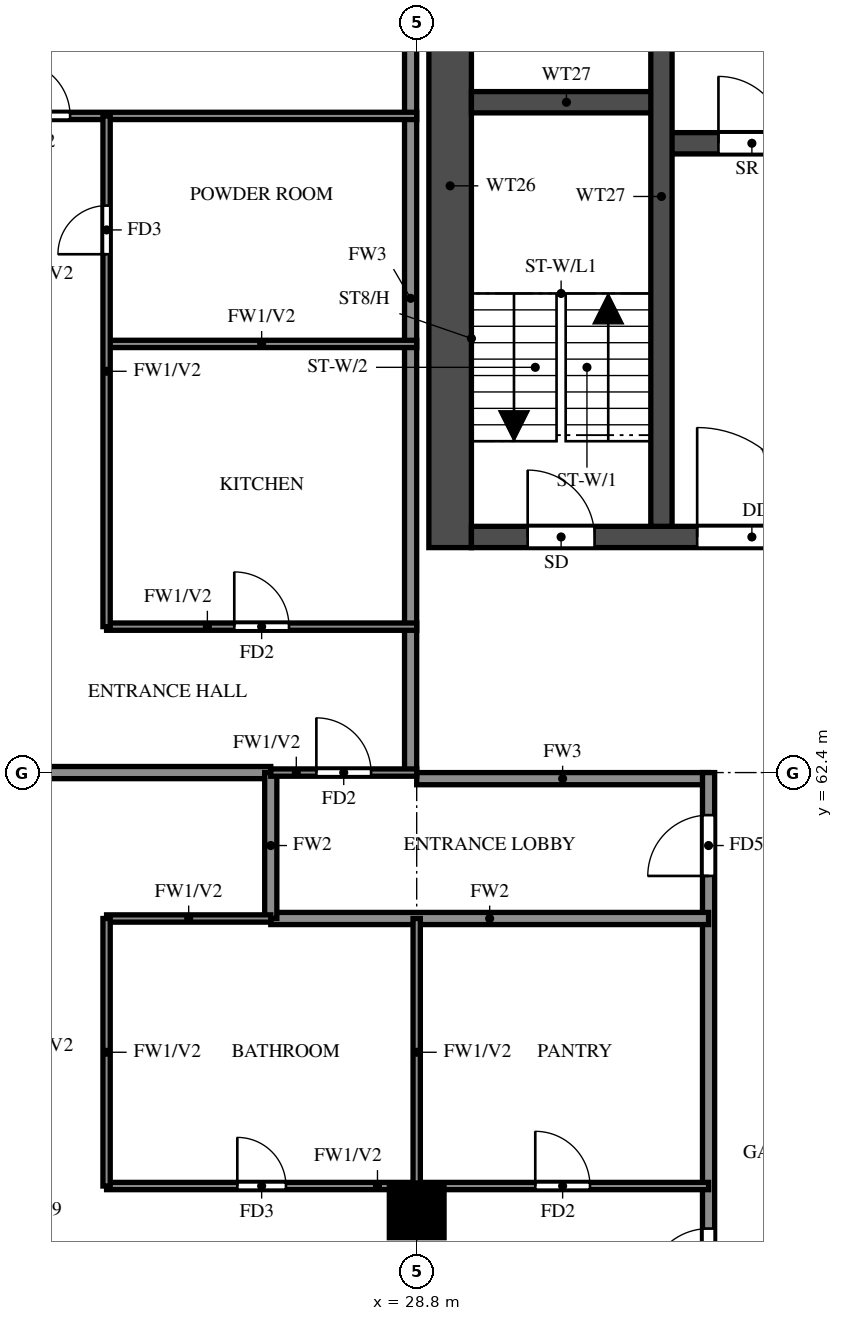
"""IFC4 building model, lengths in metres.
Left out: names, types, materials, properties, quantities, classifications, styles, units other than length and angle.
Written with IfcOpenShell. Run it as: python <this file> out.ifc"""

import sys

from ifc_helpers import new_model, si_unit, direction, frame, frame_2d, origin, origin_2d, place, context, subcontext, project, spatial, rectangle, extrude, source, transform, mapped, element, fill, save


model = new_model("IFC4")
c1 = context("Model", 3, precision=1e-05, world=origin(), true_north=direction((0.0, 1.0)))
c2 = subcontext(c1, "Body", "Model", "MODEL_VIEW")
j1 = project(units=[si_unit("LENGTHUNIT", "METRE"), si_unit("PLANEANGLEUNIT", "RADIAN")], contexts=[c1])
p1 = place(None, origin())
s1 = spatial("IfcSite", under=j1, at=p1, CompositionType="ELEMENT")
p2 = place(p1, origin())
s2 = spatial("IfcBuilding", under=s1, at=p2, CompositionType="ELEMENT")
p3 = place(p2, frame((0.0, 0.0, 199.0)))
s3 = spatial("IfcBuildingStorey", under=s2, at=p3, CompositionType="ELEMENT", Elevation=199.0)
m1 = source(origin(), c2, "Body", "SweptSolid", [
    extrude(rectangle(XDim=0.9, YDim=0.9, at=origin_2d()), origin(), (0.0, 0.0, 1.0), 3.2),
])
p4 = place(p3, frame((28.8, 55.2, 0.0), z_axis=(0.0, 0.0, 1.0), x_axis=(1.0, 0.0, 0.0)))
e1 = element("IfcColumn", 1, at=p4, inside=s3, PredefinedType="COLUMN", context=c2, shape_type="MappedRepresentation", body=[
    mapped(m1, transform((0.0, 0.0, 0.0))),
])
p5 = place(p3, frame((29.35, 66.1, 0.0), z_axis=(0.0, 0.0, 1.0), x_axis=(0.0, 1.0, 0.0)))
e2 = element("IfcWall", 2, at=p5, inside=s3, PredefinedType="SHEAR", context=c2, shape_type="SweptSolid", body=[
    extrude(rectangle(XDim=11.9, YDim=0.7, at=frame_2d((5.95, 0.0))), origin(), (0.0, 0.0, 1.0), 3.2),
])
p6 = place(p3, frame((29.7, 66.275, 0.0), z_axis=(0.0, 0.0, 1.0), x_axis=(1.0, 0.0, 0.0)))
e3 = element("IfcWall", 3, at=p6, inside=s3, PredefinedType="SHEAR", context=c2, shape_type="SweptSolid", body=[
    extrude(rectangle(XDim=41.4, YDim=0.35, at=frame_2d((20.7, 0.0))), origin(), (0.0, 0.0, 1.0), 3.2),
])
p7 = place(p6, frame((0.925, 0.0, 0.0)))
e4 = element("IfcOpeningElement", 4, at=p7, cuts=e3, PredefinedType="OPENING", context=c2, shape_type="SweptSolid", body=[
    extrude(rectangle(XDim=1.1, YDim=2.1, at=frame_2d((0.55, 1.05))), frame((0.0, 0.185, 0.0), z_axis=(0.0, -1.0, 0.0), x_axis=(1.0, 0.0, 0.0)), (0.0, 0.0, 1.0), 0.37),
])
p8 = place(p6, frame((3.712, 0.0, 0.0)))
e5 = element("IfcOpeningElement", 5, at=p8, cuts=e3, PredefinedType="OPENING", context=c2, shape_type="SweptSolid", body=[
    extrude(rectangle(XDim=1.8, YDim=2.1, at=frame_2d((0.9, 1.05))), frame((0.0, 0.185, 0.0), z_axis=(0.0, -1.0, 0.0), x_axis=(1.0, 0.0, 0.0)), (0.0, 0.0, 1.0), 0.37),
])
p9 = place(p3, frame((32.825, 72.75, 0.0), z_axis=(0.0, 0.0, 1.0), x_axis=(1.0, 0.0, 0.0)))
e6 = element("IfcWall", 6, at=p9, inside=s3, PredefinedType="SHEAR", context=c2, shape_type="SweptSolid", body=[
    extrude(rectangle(XDim=35.15, YDim=0.35, at=frame_2d((17.575, 0.0))), origin(), (0.0, 0.0, 1.0), 3.2),
])
p10 = place(p9, frame((19.8, 0.0, 0.0)))
e7 = element("IfcOpeningElement", 7, at=p10, cuts=e6, PredefinedType="OPENING", context=c2, shape_type="SweptSolid", body=[
    extrude(rectangle(XDim=1.1, YDim=2.1, at=frame_2d((0.55, 1.05))), frame((0.0, 0.185, 0.0), z_axis=(0.0, -1.0, 0.0), x_axis=(1.0, 0.0, 0.0)), (0.0, 0.0, 1.0), 0.37),
])
p11 = place(p9, frame((27.7, 0.0, 0.0)))
e8 = element("IfcOpeningElement", 8, at=p11, cuts=e6, PredefinedType="OPENING", context=c2, shape_type="SweptSolid", body=[
    extrude(rectangle(XDim=1.1, YDim=2.1, at=frame_2d((0.55, 1.05))), frame((0.0, 0.185, 0.0), z_axis=(0.0, -1.0, 0.0), x_axis=(1.0, 0.0, 0.0)), (0.0, 0.0, 1.0), 0.37),
])
p12 = place(p9, frame((30.3, 0.0, 0.0)))
e9 = element("IfcOpeningElement", 9, at=p12, cuts=e6, PredefinedType="OPENING", context=c2, shape_type="SweptSolid", body=[
    extrude(rectangle(XDim=1.1, YDim=2.1, at=frame_2d((0.55, 1.05))), frame((0.0, 0.185, 0.0), z_axis=(0.0, -1.0, 0.0), x_axis=(1.0, 0.0, 0.0)), (0.0, 0.0, 1.0), 0.37),
])
p13 = place(p9, frame((3.8, 0.0, 0.0)))
e10 = element("IfcOpeningElement", 10, at=p13, cuts=e6, PredefinedType="OPENING", context=c2, shape_type="SweptSolid", body=[
    extrude(rectangle(XDim=1.1, YDim=2.1, at=frame_2d((0.55, 1.05))), frame((0.0, 0.185, 0.0), z_axis=(0.0, -1.0, 0.0), x_axis=(1.0, 0.0, 0.0)), (0.0, 0.0, 1.0), 0.37),
])
p14 = place(p9, frame((6.55, 0.0, 0.0)))
e11 = element("IfcOpeningElement", 11, at=p14, cuts=e6, PredefinedType="OPENING", context=c2, shape_type="SweptSolid", body=[
    extrude(rectangle(XDim=1.1, YDim=2.1, at=frame_2d((0.55, 1.05))), frame((0.0, 0.185, 0.0), z_axis=(0.0, -1.0, 0.0), x_axis=(1.0, 0.0, 0.0)), (0.0, 0.0, 1.0), 0.37),
])
p15 = place(p9, frame((9.3, 0.0, 0.0)))
e12 = element("IfcOpeningElement", 12, at=p15, cuts=e6, PredefinedType="OPENING", context=c2, shape_type="SweptSolid", body=[
    extrude(rectangle(XDim=1.1, YDim=2.1, at=frame_2d((0.55, 1.05))), frame((0.0, 0.185, 0.0), z_axis=(0.0, -1.0, 0.0), x_axis=(1.0, 0.0, 0.0)), (0.0, 0.0, 1.0), 0.37),
])
p16 = place(p9, frame((12.05, 0.0, 0.0)))
e13 = element("IfcOpeningElement", 13, at=p16, cuts=e6, PredefinedType="OPENING", context=c2, shape_type="SweptSolid", body=[
    extrude(rectangle(XDim=1.1, YDim=2.1, at=frame_2d((0.55, 1.05))), frame((0.0, 0.185, 0.0), z_axis=(0.0, -1.0, 0.0), x_axis=(1.0, 0.0, 0.0)), (0.0, 0.0, 1.0), 0.37),
])
p17 = place(p9, frame((14.8, 0.0, 0.0)))
e14 = element("IfcOpeningElement", 14, at=p17, cuts=e6, PredefinedType="OPENING", context=c2, shape_type="SweptSolid", body=[
    extrude(rectangle(XDim=1.1, YDim=2.1, at=frame_2d((0.55, 1.05))), frame((0.0, 0.185, 0.0), z_axis=(0.0, -1.0, 0.0), x_axis=(1.0, 0.0, 0.0)), (0.0, 0.0, 1.0), 0.37),
])
p18 = place(p9, frame((17.55, 0.0, 0.0)))
e15 = element("IfcOpeningElement", 15, at=p18, cuts=e6, PredefinedType="OPENING", context=c2, shape_type="SweptSolid", body=[
    extrude(rectangle(XDim=1.1, YDim=2.1, at=frame_2d((0.55, 1.05))), frame((0.0, 0.185, 0.0), z_axis=(0.0, -1.0, 0.0), x_axis=(1.0, 0.0, 0.0)), (0.0, 0.0, 1.0), 0.37),
])
p19 = place(p9, frame((0.938, 0.0, 0.0)))
e16 = element("IfcOpeningElement", 16, at=p19, cuts=e6, PredefinedType="OPENING", context=c2, shape_type="SweptSolid", body=[
    extrude(rectangle(XDim=1.1, YDim=2.1, at=frame_2d((0.55, 1.05))), frame((0.0, 0.185, 0.0), z_axis=(0.0, -1.0, 0.0), x_axis=(1.0, 0.0, 0.0)), (0.0, 0.0, 1.0), 0.37),
])
p20 = place(p3, frame((29.7, 73.425, 0.0), z_axis=(0.0, 0.0, 1.0), x_axis=(1.0, 0.0, 0.0)))
e17 = element("IfcWall", 17, at=p20, inside=s3, PredefinedType="SHEAR", context=c2, shape_type="SweptSolid", body=[
    extrude(rectangle(XDim=3.125, YDim=0.35, at=frame_2d((1.562, 0.0))), origin(), (0.0, 0.0, 1.0), 3.2),
])
p21 = place(p3, frame((32.825, 66.45, 0.0), z_axis=(0.0, 0.0, 1.0), x_axis=(0.0, 1.0, 0.0)))
e18 = element("IfcWall", 18, at=p21, inside=s3, PredefinedType="SHEAR", context=c2, shape_type="SweptSolid", body=[
    extrude(rectangle(XDim=10.85, YDim=0.35, at=frame_2d((5.425, 0.0))), origin(), (0.0, 0.0, 1.0), 3.2),
])
p22 = place(p3, frame((28.8, 62.3, 0.0), z_axis=(0.0, 0.0, 1.0), x_axis=(1.0, 0.0, 0.0)))
e19 = element("IfcWall", 19, at=p22, inside=s3, PredefinedType="SOLIDWALL", context=c2, shape_type="SweptSolid", body=[
    extrude(rectangle(XDim=4.8, YDim=0.2, at=frame_2d((2.4, 0.0))), origin(), (0.0, 0.0, 1.0), 3.2),
])
p23 = place(p3, frame((28.7, 62.4, 0.0), z_axis=(0.0, 0.0, 1.0), x_axis=(0.0, 1.0, 0.0)))
e20 = element("IfcWall", 20, at=p23, inside=s3, PredefinedType="SOLIDWALL", context=c2, shape_type="SweptSolid", body=[
    extrude(rectangle(XDim=15.6, YDim=0.2, at=frame_2d((7.8, 0.0))), origin(), (0.0, 0.0, 1.0), 3.2),
])
p24 = place(p3, frame((33.6, 45.6, 0.0), z_axis=(0.0, 0.0, 1.0), x_axis=(0.0, 1.0, 0.0)))
e21 = element("IfcWall", 21, at=p24, inside=s3, PredefinedType="SOLIDWALL", context=c2, shape_type="SweptSolid", body=[
    extrude(rectangle(XDim=16.8, YDim=0.2, at=frame_2d((8.4, 0.0))), origin(), (0.0, 0.0, 1.0), 3.2),
])
p25 = place(p24, frame((0.7, 0.0, 0.0)))
e22 = element("IfcOpeningElement", 22, at=p25, cuts=e21, PredefinedType="OPENING", context=c2, shape_type="SweptSolid", body=[
    extrude(rectangle(XDim=1.0, YDim=2.1, at=frame_2d((0.5, 1.05))), frame((0.0, 0.11, 0.0), z_axis=(0.0, -1.0, 0.0), x_axis=(1.0, 0.0, 0.0)), (0.0, 0.0, 1.0), 0.22),
])
p26 = place(p24, frame((8.3, 0.0, 0.0)))
e23 = element("IfcOpeningElement", 23, at=p26, cuts=e21, PredefinedType="OPENING", context=c2, shape_type="SweptSolid", body=[
    extrude(rectangle(XDim=1.0, YDim=2.1, at=frame_2d((0.5, 1.05))), frame((0.0, 0.11, 0.0), z_axis=(0.0, -1.0, 0.0), x_axis=(1.0, 0.0, 0.0)), (0.0, 0.0, 1.0), 0.22),
])
p27 = place(p24, frame((15.1, 0.0, 0.0)))
e24 = element("IfcOpeningElement", 24, at=p27, cuts=e21, PredefinedType="OPENING", context=c2, shape_type="SweptSolid", body=[
    extrude(rectangle(XDim=1.0, YDim=2.1, at=frame_2d((0.5, 1.05))), frame((0.0, 0.11, 0.0), z_axis=(0.0, -1.0, 0.0), x_axis=(1.0, 0.0, 0.0)), (0.0, 0.0, 1.0), 0.22),
])
p28 = place(p3, frame((26.4, 60.0, 0.0), z_axis=(0.0, 0.0, 1.0), x_axis=(1.0, 0.0, 0.0)))
e25 = element("IfcWall", 25, at=p28, inside=s3, PredefinedType="SOLIDWALL", context=c2, shape_type="SweptSolid", body=[
    extrude(rectangle(XDim=7.2, YDim=0.2, at=frame_2d((3.6, 0.0))), origin(), (0.0, 0.0, 1.0), 3.2),
])
p29 = place(p3, frame((14.525, 62.4, 0.0), z_axis=(0.0, 0.0, 1.0), x_axis=(1.0, 0.0, 0.0)))
e26 = element("IfcWall", 26, at=p29, inside=s3, PredefinedType="SOLIDWALL", context=c2, shape_type="SweptSolid", body=[
    extrude(rectangle(XDim=11.875, YDim=0.2, at=frame_2d((5.938, 0.0))), origin(), (0.0, 0.0, 1.0), 3.2),
])
p30 = place(p3, frame((26.4, 60.0, 0.0), z_axis=(0.0, 0.0, 1.0), x_axis=(0.0, 1.0, 0.0)))
e27 = element("IfcWall", 27, at=p30, inside=s3, PredefinedType="SOLIDWALL", context=c2, shape_type="SweptSolid", body=[
    extrude(rectangle(XDim=2.4, YDim=0.2, at=frame_2d((1.2, 0.0))), origin(), (0.0, 0.0, 1.0), 3.2),
])
p31 = place(p3, frame((23.7, 55.6, 0.0), z_axis=(0.0, 0.0, 1.0), x_axis=(1.0, 0.0, 0.0)))
e28 = element("IfcWall", 28, at=p31, inside=s3, PredefinedType="PARTITIONING", context=c2, shape_type="SweptSolid", body=[
    extrude(rectangle(XDim=9.9, YDim=0.12, at=frame_2d((4.95, 0.0))), origin(), (0.0, 0.0, 1.0), 3.2),
])
p32 = place(p31, frame((2.15, 0.0, 0.0)))
e29 = element("IfcOpeningElement", 29, at=p32, cuts=e28, PredefinedType="OPENING", context=c2, shape_type="SweptSolid", body=[
    extrude(rectangle(XDim=0.8, YDim=2.1, at=frame_2d((0.4, 1.05))), frame((0.0, 0.07, 0.0), z_axis=(0.0, -1.0, 0.0), x_axis=(1.0, 0.0, 0.0)), (0.0, 0.0, 1.0), 0.14),
])
p33 = place(p31, frame((7.05, 0.0, 0.0)))
e30 = element("IfcOpeningElement", 30, at=p33, cuts=e28, PredefinedType="OPENING", context=c2, shape_type="SweptSolid", body=[
    extrude(rectangle(XDim=0.9, YDim=2.1, at=frame_2d((0.45, 1.05))), frame((0.0, 0.07, 0.0), z_axis=(0.0, -1.0, 0.0), x_axis=(1.0, 0.0, 0.0)), (0.0, 0.0, 1.0), 0.14),
])
p34 = place(p3, frame((23.7, 60.0, 0.0), z_axis=(0.0, 0.0, 1.0), x_axis=(1.0, 0.0, 0.0)))
e31 = element("IfcWall", 31, at=p34, inside=s3, PredefinedType="PARTITIONING", context=c2, shape_type="SweptSolid", body=[
    extrude(rectangle(XDim=2.7, YDim=0.12, at=frame_2d((1.35, 0.0))), origin(), (0.0, 0.0, 1.0), 3.2),
])
p35 = place(p3, frame((26.4, 62.4, 0.0), z_axis=(0.0, 0.0, 1.0), x_axis=(1.0, 0.0, 0.0)))
e32 = element("IfcWall", 32, at=p35, inside=s3, PredefinedType="PARTITIONING", context=c2, shape_type="SweptSolid", body=[
    extrude(rectangle(XDim=2.4, YDim=0.12, at=frame_2d((1.2, 0.0))), origin(), (0.0, 0.0, 1.0), 3.2),
])
p36 = place(p35, frame((0.75, 0.0, 0.0)))
e33 = element("IfcOpeningElement", 33, at=p36, cuts=e32, PredefinedType="OPENING", context=c2, shape_type="SweptSolid", body=[
    extrude(rectangle(XDim=0.9, YDim=2.1, at=frame_2d((0.45, 1.05))), frame((0.0, 0.07, 0.0), z_axis=(0.0, -1.0, 0.0), x_axis=(1.0, 0.0, 0.0)), (0.0, 0.0, 1.0), 0.14),
])
p37 = place(p3, frame((23.7, 64.8, 0.0), z_axis=(0.0, 0.0, 1.0), x_axis=(1.0, 0.0, 0.0)))
e34 = element("IfcWall", 34, at=p37, inside=s3, PredefinedType="PARTITIONING", context=c2, shape_type="SweptSolid", body=[
    extrude(rectangle(XDim=5.1, YDim=0.12, at=frame_2d((2.55, 0.0))), origin(), (0.0, 0.0, 1.0), 3.2),
])
p38 = place(p37, frame((2.1, 0.0, 0.0)))
e35 = element("IfcOpeningElement", 35, at=p38, cuts=e34, PredefinedType="OPENING", context=c2, shape_type="SweptSolid", body=[
    extrude(rectangle(XDim=0.9, YDim=2.1, at=frame_2d((0.45, 1.05))), frame((0.0, 0.07, 0.0), z_axis=(0.0, -1.0, 0.0), x_axis=(1.0, 0.0, 0.0)), (0.0, 0.0, 1.0), 0.14),
])
p39 = place(p3, frame((23.7, 69.45, 0.0), z_axis=(0.0, 0.0, 1.0), x_axis=(1.0, 0.0, 0.0)))
e36 = element("IfcWall", 36, at=p39, inside=s3, PredefinedType="PARTITIONING", context=c2, shape_type="SweptSolid", body=[
    extrude(rectangle(XDim=5.1, YDim=0.12, at=frame_2d((2.55, 0.0))), origin(), (0.0, 0.0, 1.0), 3.2),
])
p40 = place(p3, frame((14.525, 73.2, 0.0), z_axis=(0.0, 0.0, 1.0), x_axis=(1.0, 0.0, 0.0)))
e37 = element("IfcWall", 37, at=p40, inside=s3, PredefinedType="PARTITIONING", context=c2, shape_type="SweptSolid", body=[
    extrude(rectangle(XDim=14.275, YDim=0.12, at=frame_2d((7.138, 0.0))), origin(), (0.0, 0.0, 1.0), 2.3),
])
p41 = place(p40, frame((7.675, 0.0, 0.0)))
e38 = element("IfcOpeningElement", 38, at=p41, cuts=e37, PredefinedType="OPENING", context=c2, shape_type="SweptSolid", body=[
    extrude(rectangle(XDim=0.9, YDim=2.1, at=frame_2d((0.45, 1.05))), frame((0.0, 0.07, 0.0), z_axis=(0.0, -1.0, 0.0), x_axis=(1.0, 0.0, 0.0)), (0.0, 0.0, 1.0), 0.14),
])
p42 = place(p3, frame((23.7, 55.6, 0.0), z_axis=(0.0, 0.0, 1.0), x_axis=(0.0, 1.0, 0.0)))
e39 = element("IfcWall", 39, at=p42, inside=s3, PredefinedType="PARTITIONING", context=c2, shape_type="SweptSolid", body=[
    extrude(rectangle(XDim=4.4, YDim=0.12, at=frame_2d((2.2, 0.0))), origin(), (0.0, 0.0, 1.0), 3.2),
])
p43 = place(p3, frame((23.7, 64.8, 0.0), z_axis=(0.0, 0.0, 1.0), x_axis=(0.0, 1.0, 0.0)))
e40 = element("IfcWall", 40, at=p43, inside=s3, PredefinedType="PARTITIONING", context=c2, shape_type="SweptSolid", body=[
    extrude(rectangle(XDim=8.4, YDim=0.12, at=frame_2d((4.2, 0.0))), origin(), (0.0, 0.0, 1.0), 3.2),
])
p44 = place(p43, frame((6.125, 0.0, 0.0)))
e41 = element("IfcOpeningElement", 41, at=p44, cuts=e40, PredefinedType="OPENING", context=c2, shape_type="SweptSolid", body=[
    extrude(rectangle(XDim=0.8, YDim=2.1, at=frame_2d((0.4, 1.05))), frame((0.0, 0.07, 0.0), z_axis=(0.0, -1.0, 0.0), x_axis=(1.0, 0.0, 0.0)), (0.0, 0.0, 1.0), 0.14),
])
p45 = place(p3, frame((28.8, 55.6, 0.0), z_axis=(0.0, 0.0, 1.0), x_axis=(0.0, 1.0, 0.0)))
e42 = element("IfcWall", 42, at=p45, inside=s3, PredefinedType="PARTITIONING", context=c2, shape_type="SweptSolid", body=[
    extrude(rectangle(XDim=4.4, YDim=0.12, at=frame_2d((2.2, 0.0))), origin(), (0.0, 0.0, 1.0), 3.2),
])
p46 = place(p7, origin())
e43 = element("IfcDoor", 43, at=p46, inside=s3, OperationType="SINGLE_SWING_LEFT", PredefinedType="DOOR", context=c2, shape_type="SweptSolid", body=[
    extrude(rectangle(XDim=1.1, YDim=2.1, at=frame_2d((0.55, 1.05))), frame((0.0, 0.025, 0.0), z_axis=(0.0, -1.0, 0.0), x_axis=(1.0, 0.0, 0.0)), (0.0, 0.0, 1.0), 0.05),
])
fill(e4, e43)
p47 = place(p8, origin())
e44 = element("IfcDoor", 44, at=p47, inside=s3, OperationType="DOUBLE_DOOR_SINGLE_SWING", PredefinedType="DOOR", context=c2, shape_type="SweptSolid", body=[
    extrude(rectangle(XDim=1.8, YDim=2.1, at=frame_2d((0.9, 1.05))), frame((0.0, 0.025, 0.0), z_axis=(0.0, -1.0, 0.0), x_axis=(1.0, 0.0, 0.0)), (0.0, 0.0, 1.0), 0.05),
])
fill(e5, e44)
p48 = place(p19, origin())
e45 = element("IfcDoor", 45, at=p48, inside=s3, OperationType="SINGLE_SWING_LEFT", PredefinedType="DOOR", context=c2, shape_type="SweptSolid", body=[
    extrude(rectangle(XDim=1.1, YDim=2.1, at=frame_2d((0.55, 1.05))), frame((0.0, 0.025, 0.0), z_axis=(0.0, -1.0, 0.0), x_axis=(1.0, 0.0, 0.0)), (0.0, 0.0, 1.0), 0.05),
])
fill(e16, e45)
p49 = place(p26, origin())
e46 = element("IfcDoor", 46, at=p49, inside=s3, OperationType="SINGLE_SWING_LEFT", PredefinedType="DOOR", context=c2, shape_type="SweptSolid", body=[
    extrude(rectangle(XDim=1.0, YDim=2.1, at=frame_2d((0.5, 1.05))), frame((0.0, 0.025, 0.0), z_axis=(0.0, -1.0, 0.0), x_axis=(1.0, 0.0, 0.0)), (0.0, 0.0, 1.0), 0.05),
])
fill(e23, e46)
p50 = place(p32, origin())
e47 = element("IfcDoor", 47, at=p50, inside=s3, OperationType="SINGLE_SWING_LEFT", PredefinedType="DOOR", context=c2, shape_type="SweptSolid", body=[
    extrude(rectangle(XDim=0.8, YDim=2.1, at=frame_2d((0.4, 1.05))), frame((0.0, 0.025, 0.0), z_axis=(0.0, -1.0, 0.0), x_axis=(1.0, 0.0, 0.0)), (0.0, 0.0, 1.0), 0.05),
])
fill(e29, e47)
p51 = place(p33, origin())
e48 = element("IfcDoor", 48, at=p51, inside=s3, OperationType="SINGLE_SWING_LEFT", PredefinedType="DOOR", context=c2, shape_type="SweptSolid", body=[
    extrude(rectangle(XDim=0.9, YDim=2.1, at=frame_2d((0.45, 1.05))), frame((0.0, 0.025, 0.0), z_axis=(0.0, -1.0, 0.0), x_axis=(1.0, 0.0, 0.0)), (0.0, 0.0, 1.0), 0.05),
])
fill(e30, e48)
p52 = place(p36, origin())
e49 = element("IfcDoor", 49, at=p52, inside=s3, OperationType="SINGLE_SWING_LEFT", PredefinedType="DOOR", context=c2, shape_type="SweptSolid", body=[
    extrude(rectangle(XDim=0.9, YDim=2.1, at=frame_2d((0.45, 1.05))), frame((0.0, 0.025, 0.0), z_axis=(0.0, -1.0, 0.0), x_axis=(1.0, 0.0, 0.0)), (0.0, 0.0, 1.0), 0.05),
])
fill(e33, e49)
p53 = place(p27, origin())
e50 = element("IfcDoor", 50, at=p53, inside=s3, OperationType="SINGLE_SWING_LEFT", PredefinedType="DOOR", context=c2, shape_type="SweptSolid", body=[
    extrude(rectangle(XDim=1.0, YDim=2.1, at=frame_2d((0.5, 1.05))), frame((0.0, 0.025, 0.0), z_axis=(0.0, -1.0, 0.0), x_axis=(1.0, 0.0, 0.0)), (0.0, 0.0, 1.0), 0.05),
])
fill(e24, e50)
p54 = place(p41, origin())
e51 = element("IfcDoor", 51, at=p54, inside=s3, OperationType="SINGLE_SWING_RIGHT", PredefinedType="DOOR", context=c2, shape_type="SweptSolid", body=[
    extrude(rectangle(XDim=0.9, YDim=2.1, at=frame_2d((0.45, 1.05))), frame((0.0, 0.025, 0.0), z_axis=(0.0, -1.0, 0.0), x_axis=(1.0, 0.0, 0.0)), (0.0, 0.0, 1.0), 0.05),
])
fill(e38, e51)
p55 = place(p38, origin())
e52 = element("IfcDoor", 52, at=p55, inside=s3, OperationType="SINGLE_SWING_LEFT", PredefinedType="DOOR", context=c2, shape_type="SweptSolid", body=[
    extrude(rectangle(XDim=0.9, YDim=2.1, at=frame_2d((0.45, 1.05))), frame((0.0, 0.025, 0.0), z_axis=(0.0, -1.0, 0.0), x_axis=(1.0, 0.0, 0.0)), (0.0, 0.0, 1.0), 0.05),
])
fill(e35, e52)
p56 = place(p44, origin())
e53 = element("IfcDoor", 53, at=p56, inside=s3, OperationType="SINGLE_SWING_LEFT", PredefinedType="DOOR", context=c2, shape_type="SweptSolid", body=[
    extrude(rectangle(XDim=0.8, YDim=2.1, at=frame_2d((0.4, 1.05))), frame((0.0, 0.025, 0.0), z_axis=(0.0, -1.0, 0.0), x_axis=(1.0, 0.0, 0.0)), (0.0, 0.0, 1.0), 0.05),
])
fill(e41, e53)
save(model, sys.argv[1])
